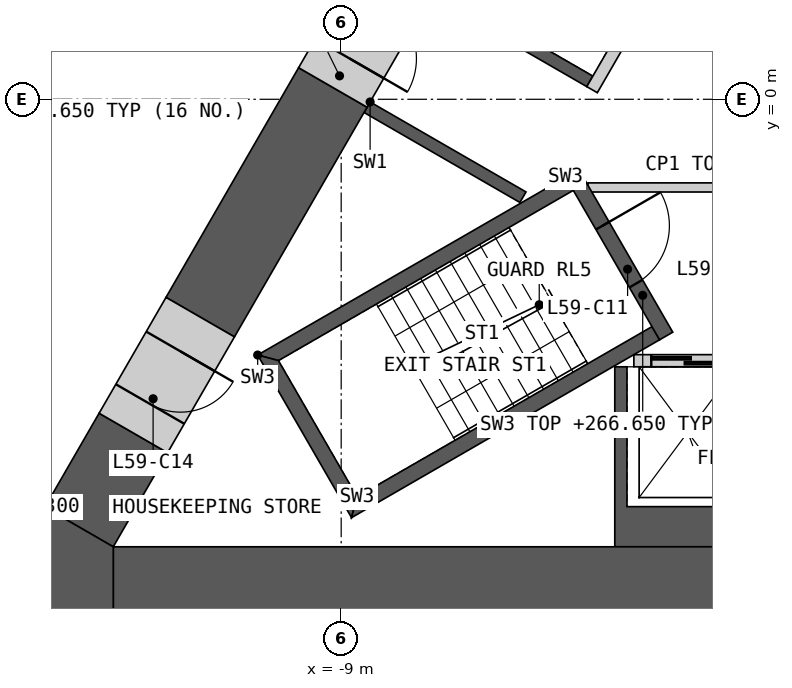
"""IFC4 building model, lengths in metres.
Left out: names, types, materials, properties, quantities, classifications, styles, units other than length and angle.
Written with IfcOpenShell. Run it as: python <this file> out.ifc"""

import sys

from ifc_helpers import new_model, si_unit, direction, frame, frame_2d, origin, place, context, subcontext, project, spatial, polyline, rectangle, outline, extrude, element, fill, save


model = new_model("IFC4")
c1 = context("Model", 3, precision=1e-05, world=origin(), true_north=direction((0.0, 1.0)))
c2 = subcontext(c1, "Body", "Model", "MODEL_VIEW")
j1 = project(units=[si_unit("LENGTHUNIT", "METRE"), si_unit("PLANEANGLEUNIT", "RADIAN")], contexts=[c1])
p1 = place(None, origin())
s1 = spatial("IfcSite", under=j1, at=p1, CompositionType="ELEMENT")
p2 = place(p1, origin())
s2 = spatial("IfcBuilding", under=s1, at=p2, CompositionType="ELEMENT")
p3 = place(p2, frame((0.0, 0.0, 263.4)))
s3 = spatial("IfcBuildingStorey", under=s2, at=p3, CompositionType="ELEMENT", Elevation=263.4)
p4 = place(p3, origin())
e1 = element("IfcWall", 1, at=p4, inside=s3, PredefinedType="SHEAR", context=c2, shape_type="SweptSolid", body=[
    extrude(outline(polyline([(0.1, -7.36), (-4.5, -7.36), (-4.5, -4.4), (-4.3, -4.4), (-4.3, -6.7), (-2.3, -6.7), (-2.3, -4.4), (-2.1, -4.4), (-2.1, -6.7), (-0.1, -6.7), (-0.1, -4.4), (0.1, -4.4), (0.1, -7.36)])), origin(), (0.0, 0.0, 1.0), 3.25),
])
p5 = place(p3, frame((-4.187, -4.3, 0.0), z_axis=(0.0, 0.0, 1.0), x_axis=(1.0, 0.0, 0.0)))
e2 = element("IfcWall", 2, at=p5, inside=s3, PredefinedType="SOLIDWALL", context=c2, shape_type="SweptSolid", body=[
    extrude(rectangle(XDim=8.373, YDim=0.2, at=frame_2d((4.187, 0.0))), origin(), (0.0, 0.0, 1.0), 3.25),
])
p6 = place(p5, frame((0.287, 0.0, 0.0)))
e3 = element("IfcOpeningElement", 3, at=p6, cuts=e2, PredefinedType="OPENING", context=c2, shape_type="SweptSolid", body=[
    extrude(rectangle(XDim=1.2, YDim=2.1, at=frame_2d((0.6, 1.05))), frame((0.0, 0.11, 0.0), z_axis=(0.0, -1.0, 0.0), x_axis=(1.0, 0.0, 0.0)), (0.0, 0.0, 1.0), 0.22),
])
p7 = place(p5, frame((2.387, 0.0, 0.0)))
e4 = element("IfcOpeningElement", 4, at=p7, cuts=e2, PredefinedType="OPENING", context=c2, shape_type="SweptSolid", body=[
    extrude(rectangle(XDim=1.4, YDim=2.1, at=frame_2d((0.7, 1.05))), frame((0.0, 0.11, 0.0), z_axis=(0.0, -1.0, 0.0), x_axis=(1.0, 0.0, 0.0)), (0.0, 0.0, 1.0), 0.22),
])
p8 = place(p5, frame((4.837, 0.0, 0.0)))
e5 = element("IfcOpeningElement", 5, at=p8, cuts=e2, PredefinedType="OPENING", context=c2, shape_type="SweptSolid", body=[
    extrude(rectangle(XDim=0.9, YDim=2.1, at=frame_2d((0.45, 1.05))), frame((0.0, 0.11, 0.0), z_axis=(0.0, -1.0, 0.0), x_axis=(1.0, 0.0, 0.0)), (0.0, 0.0, 1.0), 0.22),
])
p9 = place(p5, frame((6.887, 0.0, 0.0)))
e6 = element("IfcOpeningElement", 6, at=p9, cuts=e2, PredefinedType="OPENING", context=c2, shape_type="SweptSolid", body=[
    extrude(rectangle(XDim=1.2, YDim=2.1, at=frame_2d((0.6, 1.05))), frame((0.0, 0.11, 0.0), z_axis=(0.0, -1.0, 0.0), x_axis=(1.0, 0.0, 0.0)), (0.0, 0.0, 1.0), 0.22),
])
p10 = place(p3, origin())
e7 = element("IfcWall", 7, at=p10, inside=s3, PredefinedType="SHEAR", context=c2, shape_type="SweptSolid", body=[
    extrude(outline(polyline([(-7.524, 1.688), (-4.124, 7.577), (-3.731, 7.35), (-1.561, 6.097), (-1.66, 5.924), (-3.652, 7.074), (-4.652, 5.342), (-2.66, 4.192), (-2.76, 4.019), (-4.752, 5.169), (-5.752, 3.437), (-3.76, 2.287), (-3.861, 2.113), (-5.852, 3.263), (-6.852, 1.531), (-4.861, 0.381), (-4.96, 0.208), (-7.131, 1.461), (-7.524, 1.688)])), origin(), (0.0, 0.0, 1.0), 3.25),
])
p11 = place(p3, origin())
e8 = element("IfcWall", 8, at=p11, inside=s3, PredefinedType="SHEAR", context=c2, shape_type="SweptSolid", body=[
    extrude(outline(polyline([(-8.524, -0.044), (-8.131, -0.271), (-5.96, -1.524), (-6.061, -1.697), (-8.231, -0.444), (-8.624, -0.217), (-8.524, -0.044)])), origin(), (0.0, 0.0, 1.0), 3.25),
])
p12 = place(p3, frame((-1.631, 5.776, 0.0), z_axis=(0.0, 0.0, 1.0), x_axis=(-0.499992876559, -0.866029516466, 0.0)))
e9 = element("IfcWall", 9, at=p12, inside=s3, PredefinedType="SOLIDWALL", context=c2, shape_type="SweptSolid", body=[
    extrude(rectangle(XDim=6.486, YDim=0.2, at=frame_2d((3.243, 0.0))), origin(), (0.0, 0.0, 1.0), 3.25),
])
p13 = place(p12, frame((0.337, 0.0, 0.0)))
e10 = element("IfcOpeningElement", 10, at=p13, cuts=e9, PredefinedType="OPENING", context=c2, shape_type="SweptSolid", body=[
    extrude(rectangle(XDim=1.1, YDim=2.1, at=frame_2d((0.55, 1.05))), frame((0.0, 0.11, 0.0), z_axis=(0.0, -1.0, 0.0), x_axis=(1.0, 0.0, 0.0)), (0.0, 0.0, 1.0), 0.22),
])
p14 = place(p12, frame((2.537, 0.0, 0.0)))
e11 = element("IfcOpeningElement", 11, at=p14, cuts=e9, PredefinedType="OPENING", context=c2, shape_type="SweptSolid", body=[
    extrude(rectangle(XDim=1.1, YDim=2.1, at=frame_2d((0.55, 1.05))), frame((0.0, 0.11, 0.0), z_axis=(0.0, -1.0, 0.0), x_axis=(1.0, 0.0, 0.0)), (0.0, 0.0, 1.0), 0.22),
])
p15 = place(p3, frame((-4.941, -1.45, 0.0), z_axis=(0.0, 0.0, 1.0), x_axis=(1.0, 0.0, 0.0)))
e12 = element("IfcWall", 12, at=p15, inside=s3, PredefinedType="PARTITIONING", context=c2, shape_type="SweptSolid", body=[
    extrude(rectangle(XDim=9.882, YDim=0.15, at=frame_2d((4.941, 0.0))), origin(), (0.0, 0.0, 1.0), 3.25),
])
p16 = place(p15, frame((4.391, 0.0, 0.0)))
e13 = element("IfcOpeningElement", 13, at=p16, cuts=e12, PredefinedType="OPENING", context=c2, shape_type="SweptSolid", body=[
    extrude(rectangle(XDim=1.1, YDim=2.1, at=frame_2d((0.55, 1.05))), frame((0.0, 0.085, 0.0), z_axis=(0.0, -1.0, 0.0), x_axis=(1.0, 0.0, 0.0)), (0.0, 0.0, 1.0), 0.17),
])
p17 = place(p3, origin())
e14 = element("IfcWall", 14, at=p17, inside=s3, PredefinedType="SHEAR", context=c2, shape_type="SweptSolid", body=[
    extrude(outline(polyline([(-5.307, -1.281), (-10.374, -4.206), (-10.032, -4.298), (-5.182, -1.498), (-5.307, -1.281)])), origin(), (0.0, 0.0, 1.0), 3.25),
])
p18 = place(p3, origin())
e15 = element("IfcWall", 15, at=p18, inside=s3, PredefinedType="SHEAR", context=c2, shape_type="SweptSolid", body=[
    extrude(outline(polyline([(-10.374, -4.206), (-8.83, -6.881), (-8.738, -6.539), (-10.032, -4.298), (-10.374, -4.206)])), origin(), (0.0, 0.0, 1.0), 3.25),
])
p19 = place(p3, origin())
e16 = element("IfcWall", 16, at=p19, inside=s3, PredefinedType="SHEAR", context=c2, shape_type="SweptSolid", body=[
    extrude(outline(polyline([(-8.738, -6.539), (-8.83, -6.881), (-3.763, -3.956), (-3.888, -3.739), (-8.738, -6.539)])), origin(), (0.0, 0.0, 1.0), 3.25),
])
p20 = place(p3, frame((-5.199, -1.219, 0.0), z_axis=(0.0, 0.0, 1.0), x_axis=(0.499982516597, -0.866035497597, 0.0)))
e17 = element("IfcWall", 17, at=p20, inside=s3, PredefinedType="SHEAR", context=c2, shape_type="SweptSolid", body=[
    extrude(rectangle(XDim=3.088, YDim=0.25, at=frame_2d((1.544, 0.0))), origin(), (0.0, 0.0, 1.0), 3.25),
])
p21 = place(p20, frame((0.994, 0.0, 0.0)))
e18 = element("IfcOpeningElement", 18, at=p21, cuts=e17, PredefinedType="OPENING", context=c2, shape_type="SweptSolid", body=[
    extrude(rectangle(XDim=1.1, YDim=2.1, at=frame_2d((0.55, 1.05))), frame((0.0, 0.135, 0.0), z_axis=(0.0, -1.0, 0.0), x_axis=(1.0, 0.0, 0.0)), (0.0, 0.0, 1.0), 0.27),
])
p22 = place(p3, frame((-12.748, -8.01, 0.0), z_axis=(0.0, 0.0, 1.0), x_axis=(1.0, 0.0, 0.0)))
e19 = element("IfcWall", 19, at=p22, inside=s3, PredefinedType="SHEAR", context=c2, shape_type="SweptSolid", body=[
    extrude(rectangle(XDim=25.497, YDim=1.3, at=frame_2d((12.748, 0.0))), origin(), (0.0, 0.0, 1.0), 3.25),
])
p23 = place(p3, frame((-9.137, 0.195, 0.0), z_axis=(0.0, 0.0, 1.0), x_axis=(-0.499985697398, -0.866033661238, 0.0)))
e20 = element("IfcWall", 20, at=p23, inside=s3, PredefinedType="SHEAR", context=c2, shape_type="SweptSolid", body=[
    extrude(rectangle(XDim=4.362, YDim=1.3, at=frame_2d((2.181, 0.0))), origin(), (0.0, 0.0, 1.0), 3.25),
])
p24 = place(p3, frame((-12.418, -5.488, 0.0), z_axis=(0.0, 0.0, 1.0), x_axis=(-0.499931460552, -0.866064971437, 0.0)))
e21 = element("IfcWall", 21, at=p24, inside=s3, PredefinedType="SHEAR", context=c2, shape_type="SweptSolid", body=[
    extrude(rectangle(XDim=1.786, YDim=1.3, at=frame_2d((0.893, 0.0))), origin(), (0.0, 0.0, 1.0), 3.25),
])
p25 = place(p3, origin())
e22 = element("IfcWall", 22, at=p25, inside=s3, PredefinedType="SHEAR", context=c2, shape_type="SweptSolid", body=[
    extrude(outline(polyline([(-13.874, -6.71), (-12.748, -7.36), (-12.748, -8.66), (-15.0, -8.66), (-13.874, -6.71)])), origin(), (0.0, 0.0, 1.0), 3.25),
])
p26 = place(p3, frame((-11.318, -3.583, 0.0), z_axis=(0.0, 0.0, 1.0), x_axis=(-0.50002983664, -0.866008176907, 0.0)))
e23 = element("IfcWall", 23, at=p26, inside=s3, PredefinedType="SHEAR", context=c2, shape_type="SweptSolid", body=[
    extrude(rectangle(XDim=2.2, YDim=1.3, at=frame_2d((1.1, 0.0))), origin(), (0.0, 0.0, 1.0), 3.25),
])
p27 = place(p26, frame((0.65, 0.0, 0.0)))
e24 = element("IfcOpeningElement", 24, at=p27, cuts=e23, PredefinedType="OPENING", context=c2, shape_type="SweptSolid", body=[
    extrude(rectangle(XDim=1.0, YDim=2.1, at=frame_2d((0.5, 1.05))), frame((0.0, 0.66, 0.0), z_axis=(0.0, -1.0, 0.0), x_axis=(1.0, 0.0, 0.0)), (0.0, 0.0, 1.0), 1.32),
])
p28 = place(p3, frame((-8.037, 2.1, 0.0), z_axis=(0.0, 0.0, 1.0), x_axis=(-0.50002983664, -0.866008176907, 0.0)))
e25 = element("IfcWall", 25, at=p28, inside=s3, PredefinedType="SHEAR", context=c2, shape_type="SweptSolid", body=[
    extrude(rectangle(XDim=2.2, YDim=1.3, at=frame_2d((1.1, 0.0))), origin(), (0.0, 0.0, 1.0), 3.25),
])
p29 = place(p28, frame((0.55, 0.0, 0.0)))
e26 = element("IfcOpeningElement", 26, at=p29, cuts=e25, PredefinedType="OPENING", context=c2, shape_type="SweptSolid", body=[
    extrude(rectangle(XDim=1.1, YDim=2.1, at=frame_2d((0.55, 1.05))), frame((0.0, 0.66, 0.0), z_axis=(0.0, -1.0, 0.0), x_axis=(1.0, 0.0, 0.0)), (0.0, 0.0, 1.0), 1.32),
])
p30 = place(p3, frame((-18.976, -4.747, 0.0), z_axis=(0.0, 0.0, 1.0), x_axis=(0.499999852422, 0.866025488988, 0.0)))
e27 = element("IfcWall", 27, at=p30, inside=s3, PredefinedType="PARTITIONING", context=c2, shape_type="SweptSolid", body=[
    extrude(rectangle(XDim=27.198, YDim=0.2, at=frame_2d((13.599, 0.0))), origin(), (0.0, 0.0, 1.0), 3.25),
])
p31 = place(p30, frame((19.886, 0.0, 0.0)))
e28 = element("IfcOpeningElement", 28, at=p31, cuts=e27, PredefinedType="OPENING", context=c2, shape_type="SweptSolid", body=[
    extrude(rectangle(XDim=0.95, YDim=2.1, at=frame_2d((0.475, 1.05))), frame((0.0, 0.11, 0.0), z_axis=(0.0, -1.0, 0.0), x_axis=(1.0, 0.0, 0.0)), (0.0, 0.0, 1.0), 0.22),
])
p32 = place(p30, frame((11.895, 0.0, 0.0)))
e29 = element("IfcOpeningElement", 29, at=p32, cuts=e27, PredefinedType="OPENING", context=c2, shape_type="SweptSolid", body=[
    extrude(rectangle(XDim=1.1, YDim=2.1, at=frame_2d((0.55, 1.05))), frame((0.0, 0.11, 0.0), z_axis=(0.0, -1.0, 0.0), x_axis=(1.0, 0.0, 0.0)), (0.0, 0.0, 1.0), 0.22),
])
p33 = place(p30, frame((1.152, 0.0, 0.0)))
e30 = element("IfcOpeningElement", 30, at=p33, cuts=e27, PredefinedType="OPENING", context=c2, shape_type="SweptSolid", body=[
    extrude(rectangle(XDim=0.95, YDim=2.1, at=frame_2d((0.475, 1.05))), frame((0.0, 0.11, 0.0), z_axis=(0.0, -1.0, 0.0), x_axis=(1.0, 0.0, 0.0)), (0.0, 0.0, 1.0), 0.22),
])
p34 = place(p6, origin())
e31 = element("IfcDoor", 31, at=p34, inside=s3, OperationType="SLIDING_TO_LEFT", PredefinedType="DOOR", context=c2, shape_type="SweptSolid", body=[
    extrude(rectangle(XDim=1.2, YDim=2.1, at=frame_2d((0.6, 1.05))), frame((0.0, 0.025, 0.0), z_axis=(0.0, -1.0, 0.0), x_axis=(1.0, 0.0, 0.0)), (0.0, 0.0, 1.0), 0.05),
])
fill(e3, e31)
p35 = place(p21, origin())
e32 = element("IfcDoor", 32, at=p35, inside=s3, OperationType="SINGLE_SWING_LEFT", PredefinedType="DOOR", context=c2, shape_type="SweptSolid", body=[
    extrude(rectangle(XDim=1.1, YDim=2.1, at=frame_2d((0.55, 1.05))), frame((0.0, 0.025, 0.0), z_axis=(0.0, -1.0, 0.0), x_axis=(1.0, 0.0, 0.0)), (0.0, 0.0, 1.0), 0.05),
])
fill(e18, e32)
p36 = place(p27, origin())
e33 = element("IfcDoor", 33, at=p36, inside=s3, OperationType="SINGLE_SWING_LEFT", PredefinedType="DOOR", context=c2, shape_type="SweptSolid", body=[
    extrude(rectangle(XDim=1.0, YDim=2.1, at=frame_2d((0.5, 1.05))), frame((0.0, 0.405, 0.0), z_axis=(0.0, -1.0, 0.0), x_axis=(1.0, 0.0, 0.0)), (0.0, 0.0, 1.0), 0.05),
])
fill(e24, e33)
p37 = place(p29, origin())
e34 = element("IfcDoor", 34, at=p37, inside=s3, OperationType="SINGLE_SWING_RIGHT", PredefinedType="DOOR", context=c2, shape_type="SweptSolid", body=[
    extrude(rectangle(XDim=1.1, YDim=2.1, at=frame_2d((0.55, 1.05))), frame((0.0, 0.405, 0.0), z_axis=(0.0, -1.0, 0.0), x_axis=(1.0, 0.0, 0.0)), (0.0, 0.0, 1.0), 0.05),
])
fill(e26, e34)
save(model, sys.argv[1])
